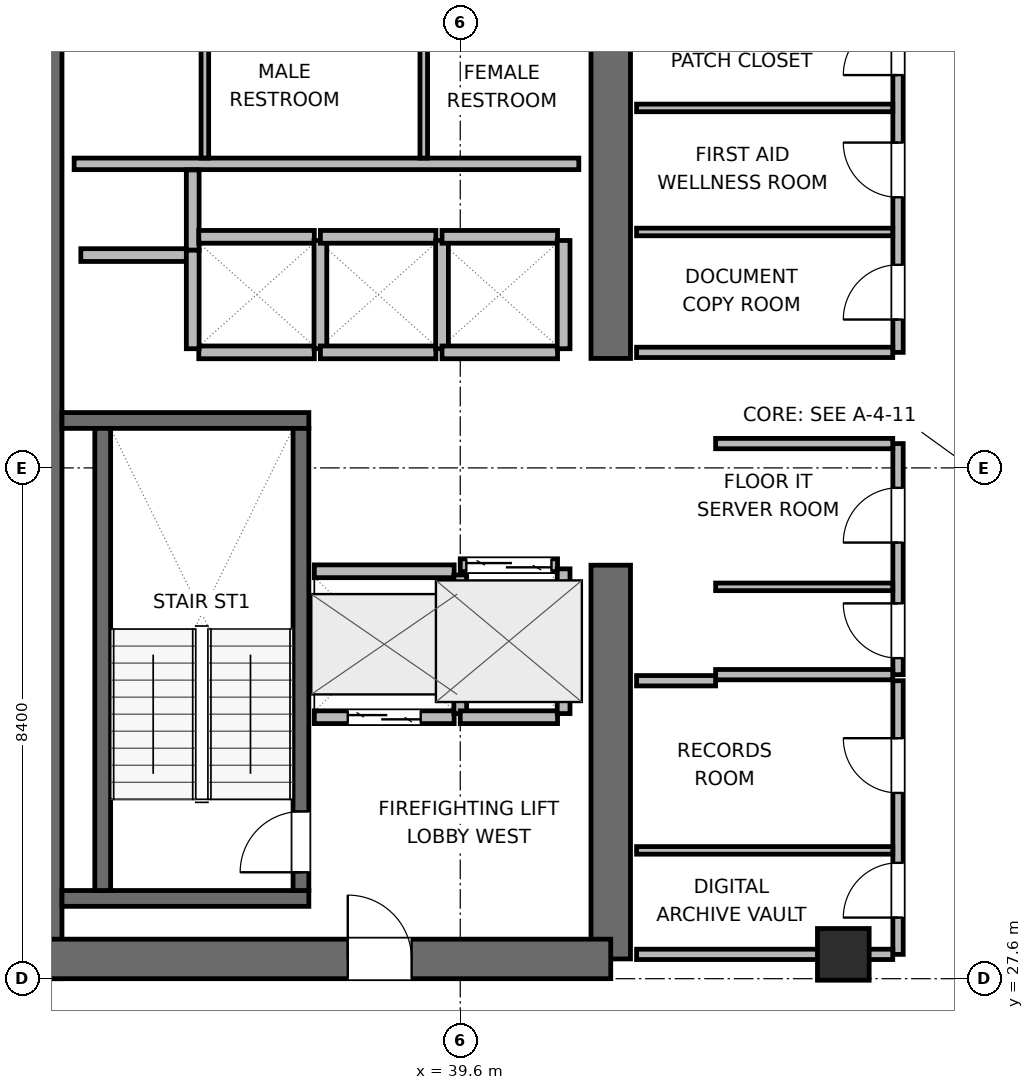
"""IFC4 building model, lengths in metres.
Left out: names, types, materials, properties, quantities, classifications, styles, units other than length and angle.
Written with IfcOpenShell. Run it as: python <this file> out.ifc"""

import sys

from ifc_helpers import new_model, si_unit, direction, frame, frame_2d, origin, origin_2d, place, context, subcontext, project, spatial, rectangle, extrude, element, fill, save


model = new_model("IFC4")
c1 = context("Model", 3, precision=1e-05, world=origin(), true_north=direction((0.0, 1.0)))
c2 = subcontext(c1, "Body", "Model", "MODEL_VIEW")
j1 = project(units=[si_unit("LENGTHUNIT", "METRE"), si_unit("PLANEANGLEUNIT", "RADIAN")], contexts=[c1])
p1 = place(None, origin())
s1 = spatial("IfcSite", under=j1, at=p1, CompositionType="ELEMENT")
p2 = place(p1, origin())
s2 = spatial("IfcBuilding", under=s1, at=p2, CompositionType="ELEMENT")
p3 = place(p2, frame((0.0, 0.0, 219.3)))
s3 = spatial("IfcBuildingStorey", under=s2, at=p3, CompositionType="ELEMENT", Elevation=219.3)
p4 = place(p3, frame((32.725, 27.6, 0.0), z_axis=(0.0, 0.0, 1.0), x_axis=(0.0, 1.0, 0.0)))
e1 = element("IfcWall", 1, at=p4, inside=s3, PredefinedType="SHEAR", context=c2, shape_type="SweptSolid", body=[
    extrude(rectangle(XDim=16.8, YDim=0.65, at=frame_2d((8.4, 0.0))), origin(), (0.0, 0.0, 1.0), 3.9),
])
p5 = place(p3, frame((42.075, 27.925, 0.0), z_axis=(0.0, 0.0, 1.0), x_axis=(0.0, 1.0, 0.0)))
e2 = element("IfcWall", 2, at=p5, inside=s3, PredefinedType="SHEAR", context=c2, shape_type="SweptSolid", body=[
    extrude(rectangle(XDim=6.475, YDim=0.65, at=frame_2d((3.237, 0.0))), origin(), (0.0, 0.0, 1.0), 3.9),
])
p6 = place(p3, frame((42.075, 37.8, 0.0), z_axis=(0.0, 0.0, 1.0), x_axis=(0.0, 1.0, 0.0)))
e3 = element("IfcWall", 3, at=p6, inside=s3, PredefinedType="SHEAR", context=c2, shape_type="SweptSolid", body=[
    extrude(rectangle(XDim=6.275, YDim=0.65, at=frame_2d((3.137, 0.0))), origin(), (0.0, 0.0, 1.0), 3.9),
])
p7 = place(p3, frame((32.725, 27.925, 0.0), z_axis=(0.0, 0.0, 1.0), x_axis=(1.0, 0.0, 0.0)))
e4 = element("IfcWall", 4, at=p7, inside=s3, PredefinedType="SHEAR", context=c2, shape_type="SweptSolid", body=[
    extrude(rectangle(XDim=9.35, YDim=0.65, at=frame_2d((4.675, 0.0))), origin(), (0.0, 0.0, 1.0), 3.9),
])
p8 = place(p7, frame((5.025, 0.0, 0.0)))
e5 = element("IfcOpeningElement", 5, at=p8, cuts=e4, PredefinedType="OPENING", context=c2, shape_type="SweptSolid", body=[
    extrude(rectangle(XDim=1.05, YDim=2.04, at=frame_2d((0.525, 1.02))), frame((0.0, 0.335, 0.0), z_axis=(0.0, -1.0, 0.0), x_axis=(1.0, 0.0, 0.0)), (0.0, 0.0, 1.0), 0.67),
])
for number, where, z_axis, x_axis in (
    (6, (33.05, 28.92, 0.0), (0.0, 0.0, 1.0), (1.0, 0.0, 0.0)),
    (7, (33.05, 36.78, 0.0), (0.0, 0.0, 1.0), (1.0, 0.0, 0.0)),
):
    element("IfcWall", number, at=place(p3, frame(where, z_axis=z_axis, x_axis=x_axis)), inside=s3, PredefinedType="SHEAR", context=c2, shape_type="SweptSolid", body=[
        extrude(rectangle(XDim=4.06, YDim=0.26, at=frame_2d((2.03, 0.0))), origin(), (0.0, 0.0, 1.0), 3.9),
    ])
p9 = place(p3, frame((33.72, 29.05, 0.0), z_axis=(0.0, 0.0, 1.0), x_axis=(0.0, 1.0, 0.0)))
e8 = element("IfcWall", 8, at=p9, inside=s3, PredefinedType="SHEAR", context=c2, shape_type="SweptSolid", body=[
    extrude(rectangle(XDim=7.6, YDim=0.26, at=frame_2d((3.8, 0.0))), origin(), (0.0, 0.0, 1.0), 3.9),
])
p10 = place(p3, frame((36.98, 29.05, 0.0), z_axis=(0.0, 0.0, 1.0), x_axis=(0.0, 1.0, 0.0)))
e9 = element("IfcWall", 9, at=p10, inside=s3, PredefinedType="SHEAR", context=c2, shape_type="SweptSolid", body=[
    extrude(rectangle(XDim=7.6, YDim=0.26, at=frame_2d((3.8, 0.0))), origin(), (0.0, 0.0, 1.0), 3.9),
])
p11 = place(p10, frame((0.3, 0.0, 0.0)))
e10 = element("IfcOpeningElement", 10, at=p11, cuts=e9, PredefinedType="OPENING", context=c2, shape_type="SweptSolid", body=[
    extrude(rectangle(XDim=1.0, YDim=2.04, at=frame_2d((0.5, 1.02))), frame((0.0, 0.14, 0.0), z_axis=(0.0, -1.0, 0.0), x_axis=(1.0, 0.0, 0.0)), (0.0, 0.0, 1.0), 0.28),
])
p12 = place(p3, frame((45.9, 28.0, 0.0), z_axis=(0.0, 0.0, 1.0), x_axis=(1.0, 0.0, 0.0)))
e11 = element("IfcColumn", 11, at=p12, inside=s3, PredefinedType="COLUMN", context=c2, shape_type="SweptSolid", body=[
    extrude(rectangle(XDim=0.85, YDim=0.85, at=origin_2d()), origin(), (0.0, 0.0, 1.0), 3.9),
])
p13 = place(p3, frame((33.25, 41.0, 0.0), z_axis=(0.0, 0.0, 1.0), x_axis=(1.0, 0.0, 0.0)))
e12 = element("IfcWall", 12, at=p13, inside=s3, PredefinedType="PLUMBINGWALL", context=c2, shape_type="SweptSolid", body=[
    extrude(rectangle(XDim=8.3, YDim=0.19, at=frame_2d((4.15, 0.0))), origin(), (0.0, 0.0, 1.0), 3.68),
])
for number, where, z_axis, x_axis in (
    (13, (35.4, 41.095, 0.0), (0.0, 0.0, 1.0), (0.0, 1.0, 0.0)),
    (14, (39.0, 41.095, 0.0), (0.0, 0.0, 1.0), (0.0, 1.0, 0.0)),
):
    element("IfcWall", number, at=place(p3, frame(where, z_axis=z_axis, x_axis=x_axis)), inside=s3, PredefinedType="PARTITIONING", context=c2, shape_type="SweptSolid", body=[
        extrude(rectangle(XDim=2.455, YDim=0.125, at=frame_2d((1.228, 0.0))), origin(), (0.0, 0.0, 1.0), 3.68),
    ])
p14 = place(p3, frame((33.36, 39.5, 0.0), z_axis=(0.0, 0.0, 1.0), x_axis=(1.0, 0.0, 0.0)))
e15 = element("IfcWall", 15, at=p14, inside=s3, PredefinedType="PARTITIONING", context=c2, shape_type="SweptSolid", body=[
    extrude(rectangle(XDim=1.86, YDim=0.21, at=frame_2d((0.93, 0.0))), origin(), (0.0, 0.0, 1.0), 3.68),
])
p15 = place(p3, frame((35.2, 39.58, 0.0), z_axis=(0.0, 0.0, 1.0), x_axis=(0.0, 1.0, 0.0)))
e16 = element("IfcWall", 16, at=p15, inside=s3, PredefinedType="PARTITIONING", context=c2, shape_type="SweptSolid", body=[
    extrude(rectangle(XDim=1.32, YDim=0.21, at=frame_2d((0.66, 0.0))), origin(), (0.0, 0.0, 1.0), 3.68),
])
p16 = place(p3, frame((37.2, 31.9, 0.0), z_axis=(0.0, 0.0, 1.0), x_axis=(1.0, 0.0, 0.0)))
e17 = element("IfcWall", 17, at=p16, inside=s3, PredefinedType="PARTITIONING", context=c2, shape_type="SweptSolid", body=[
    extrude(rectangle(XDim=2.3, YDim=0.21, at=frame_2d((1.15, 0.0))), origin(), (0.0, 0.0, 1.0), 3.68),
])
p17 = place(p16, frame((0.55, 0.0, 0.0)))
e18 = element("IfcOpeningElement", 18, at=p17, cuts=e17, PredefinedType="OPENING", context=c2, shape_type="SweptSolid", body=[
    extrude(rectangle(XDim=1.2, YDim=2.04, at=frame_2d((0.6, 1.02))), frame((0.0, 0.115, 0.0), z_axis=(0.0, -1.0, 0.0), x_axis=(1.0, 0.0, 0.0)), (0.0, 0.0, 1.0), 0.23),
])
p18 = place(p3, frame((37.2, 34.3, 0.0), z_axis=(0.0, 0.0, 1.0), x_axis=(1.0, 0.0, 0.0)))
e19 = element("IfcWall", 19, at=p18, inside=s3, PredefinedType="PARTITIONING", context=c2, shape_type="SweptSolid", body=[
    extrude(rectangle(XDim=2.3, YDim=0.21, at=frame_2d((1.15, 0.0))), origin(), (0.0, 0.0, 1.0), 3.68),
])
p19 = place(p3, frame((39.6, 31.96, 0.0), z_axis=(0.0, 0.0, 1.0), x_axis=(0.0, 1.0, 0.0)))
e20 = element("IfcWall", 20, at=p19, inside=s3, PredefinedType="PARTITIONING", context=c2, shape_type="SweptSolid", body=[
    extrude(rectangle(XDim=2.28, YDim=0.21, at=frame_2d((1.14, 0.0))), origin(), (0.0, 0.0, 1.0), 3.68),
])
p20 = place(p3, frame((39.6, 34.4, 0.0), z_axis=(0.0, 0.0, 1.0), x_axis=(1.0, 0.0, 0.0)))
e21 = element("IfcWall", 21, at=p20, inside=s3, PredefinedType="PARTITIONING", context=c2, shape_type="SweptSolid", body=[
    extrude(rectangle(XDim=1.6, YDim=0.21, at=frame_2d((0.8, 0.0))), origin(), (0.0, 0.0, 1.0), 3.68),
])
p21 = place(p20, frame((0.1, 0.0, 0.0)))
e22 = element("IfcOpeningElement", 22, at=p21, cuts=e21, PredefinedType="OPENING", context=c2, shape_type="SweptSolid", body=[
    extrude(rectangle(XDim=1.4, YDim=2.06, at=frame_2d((0.7, 1.03))), frame((0.0, 0.115, 0.0), z_axis=(0.0, -1.0, 0.0), x_axis=(1.0, 0.0, 0.0)), (0.0, 0.0, 1.0), 0.23),
])
p22 = place(p3, frame((39.6, 31.9, 0.0), z_axis=(0.0, 0.0, 1.0), x_axis=(1.0, 0.0, 0.0)))
e23 = element("IfcWall", 23, at=p22, inside=s3, PredefinedType="PARTITIONING", context=c2, shape_type="SweptSolid", body=[
    extrude(rectangle(XDim=1.6, YDim=0.21, at=frame_2d((0.8, 0.0))), origin(), (0.0, 0.0, 1.0), 3.68),
])
p23 = place(p3, frame((41.3, 31.96, 0.0), z_axis=(0.0, 0.0, 1.0), x_axis=(0.0, 1.0, 0.0)))
e24 = element("IfcWall", 24, at=p23, inside=s3, PredefinedType="PARTITIONING", context=c2, shape_type="SweptSolid", body=[
    extrude(rectangle(XDim=2.38, YDim=0.21, at=frame_2d((1.19, 0.0))), origin(), (0.0, 0.0, 1.0), 3.68),
])
for number, where, z_axis, x_axis in (
    (25, (35.3, 37.9, 0.0), (0.0, 0.0, 1.0), (1.0, 0.0, 0.0)),
    (26, (35.3, 39.8, 0.0), (0.0, 0.0, 1.0), (1.0, 0.0, 0.0)),
):
    element("IfcWall", number, at=place(p3, frame(where, z_axis=z_axis, x_axis=x_axis)), inside=s3, PredefinedType="PARTITIONING", context=c2, shape_type="SweptSolid", body=[
        extrude(rectangle(XDim=1.9, YDim=0.21, at=frame_2d((0.95, 0.0))), origin(), (0.0, 0.0, 1.0), 3.68),
    ])
p24 = place(p3, frame((35.2, 37.96, 0.0), z_axis=(0.0, 0.0, 1.0), x_axis=(0.0, 1.0, 0.0)))
e27 = element("IfcWall", 27, at=p24, inside=s3, PredefinedType="PARTITIONING", context=c2, shape_type="SweptSolid", body=[
    extrude(rectangle(XDim=1.62, YDim=0.21, at=frame_2d((0.81, 0.0))), origin(), (0.0, 0.0, 1.0), 3.68),
])
p25 = place(p3, frame((37.3, 37.96, 0.0), z_axis=(0.0, 0.0, 1.0), x_axis=(0.0, 1.0, 0.0)))
e28 = element("IfcWall", 28, at=p25, inside=s3, PredefinedType="PARTITIONING", context=c2, shape_type="SweptSolid", body=[
    extrude(rectangle(XDim=1.78, YDim=0.21, at=frame_2d((0.89, 0.0))), origin(), (0.0, 0.0, 1.0), 3.68),
])
for number, where, z_axis, x_axis in (
    (29, (37.3, 37.9, 0.0), (0.0, 0.0, 1.0), (1.0, 0.0, 0.0)),
    (30, (37.3, 39.8, 0.0), (0.0, 0.0, 1.0), (1.0, 0.0, 0.0)),
):
    element("IfcWall", number, at=place(p3, frame(where, z_axis=z_axis, x_axis=x_axis)), inside=s3, PredefinedType="PARTITIONING", context=c2, shape_type="SweptSolid", body=[
        extrude(rectangle(XDim=1.9, YDim=0.21, at=frame_2d((0.95, 0.0))), origin(), (0.0, 0.0, 1.0), 3.68),
    ])
p26 = place(p3, frame((39.3, 37.96, 0.0), z_axis=(0.0, 0.0, 1.0), x_axis=(0.0, 1.0, 0.0)))
e31 = element("IfcWall", 31, at=p26, inside=s3, PredefinedType="PARTITIONING", context=c2, shape_type="SweptSolid", body=[
    extrude(rectangle(XDim=1.78, YDim=0.21, at=frame_2d((0.89, 0.0))), origin(), (0.0, 0.0, 1.0), 3.68),
])
for number, where, z_axis, x_axis in (
    (32, (39.3, 37.9, 0.0), (0.0, 0.0, 1.0), (1.0, 0.0, 0.0)),
    (33, (39.3, 39.8, 0.0), (0.0, 0.0, 1.0), (1.0, 0.0, 0.0)),
):
    element("IfcWall", number, at=place(p3, frame(where, z_axis=z_axis, x_axis=x_axis)), inside=s3, PredefinedType="PARTITIONING", context=c2, shape_type="SweptSolid", body=[
        extrude(rectangle(XDim=1.9, YDim=0.21, at=frame_2d((0.95, 0.0))), origin(), (0.0, 0.0, 1.0), 3.68),
    ])
p27 = place(p3, frame((41.3, 37.96, 0.0), z_axis=(0.0, 0.0, 1.0), x_axis=(0.0, 1.0, 0.0)))
e34 = element("IfcWall", 34, at=p27, inside=s3, PredefinedType="PARTITIONING", context=c2, shape_type="SweptSolid", body=[
    extrude(rectangle(XDim=1.78, YDim=0.21, at=frame_2d((0.89, 0.0))), origin(), (0.0, 0.0, 1.0), 3.68),
])
p28 = place(p3, frame((46.8, 32.6, 0.0), z_axis=(0.0, 0.0, 1.0), x_axis=(0.0, 1.0, 0.0)))
e35 = element("IfcWall", 35, at=p28, inside=s3, PredefinedType="PARTITIONING", context=c2, shape_type="SweptSolid", body=[
    extrude(rectangle(XDim=3.8, YDim=0.17, at=frame_2d((1.9, 0.0))), origin(), (0.0, 0.0, 1.0), 3.68),
])
p29 = place(p28, frame((0.272, 0.0, 0.0)))
e36 = element("IfcOpeningElement", 36, at=p29, cuts=e35, PredefinedType="OPENING", context=c2, shape_type="SweptSolid", body=[
    extrude(rectangle(XDim=0.9, YDim=2.02, at=frame_2d((0.45, 1.01))), frame((0.0, 0.095, 0.0), z_axis=(0.0, -1.0, 0.0), x_axis=(1.0, 0.0, 0.0)), (0.0, 0.0, 1.0), 0.19),
])
p30 = place(p28, frame((2.172, 0.0, 0.0)))
e37 = element("IfcOpeningElement", 37, at=p30, cuts=e35, PredefinedType="OPENING", context=c2, shape_type="SweptSolid", body=[
    extrude(rectangle(XDim=0.9, YDim=2.02, at=frame_2d((0.45, 1.01))), frame((0.0, 0.095, 0.0), z_axis=(0.0, -1.0, 0.0), x_axis=(1.0, 0.0, 0.0)), (0.0, 0.0, 1.0), 0.19),
])
for number, where, z_axis, x_axis in (
    (38, (43.8, 32.6, 0.0), (0.0, 0.0, 1.0), (1.0, 0.0, 0.0)),
    (39, (43.8, 36.4, 0.0), (0.0, 0.0, 1.0), (1.0, 0.0, 0.0)),
):
    element("IfcWall", number, at=place(p3, frame(where, z_axis=z_axis, x_axis=x_axis)), inside=s3, PredefinedType="PARTITIONING", context=c2, shape_type="SweptSolid", body=[
        extrude(rectangle(XDim=2.913, YDim=0.17, at=frame_2d((1.457, 0.0))), origin(), (0.0, 0.0, 1.0), 3.68),
    ])
p31 = place(p3, frame((43.8, 34.044, 0.0), z_axis=(0.0, 0.0, 1.0), x_axis=(1.0, 0.0, 0.0)))
e40 = element("IfcWall", 40, at=p31, inside=s3, PredefinedType="PARTITIONING", context=c2, shape_type="SweptSolid", body=[
    extrude(rectangle(XDim=2.913, YDim=0.125, at=frame_2d((1.457, 0.0))), origin(), (0.0, 0.0, 1.0), 3.68),
])
p32 = place(p3, frame((46.8, 28.0, 0.0), z_axis=(0.0, 0.0, 1.0), x_axis=(0.0, 1.0, 0.0)))
e41 = element("IfcWall", 41, at=p32, inside=s3, PredefinedType="PARTITIONING", context=c2, shape_type="SweptSolid", body=[
    extrude(rectangle(XDim=4.5, YDim=0.17, at=frame_2d((2.25, 0.0))), origin(), (0.0, 0.0, 1.0), 3.68),
])
p33 = place(p32, frame((0.605, 0.0, 0.0)))
e42 = element("IfcOpeningElement", 42, at=p33, cuts=e41, PredefinedType="OPENING", context=c2, shape_type="SweptSolid", body=[
    extrude(rectangle(XDim=0.9, YDim=2.02, at=frame_2d((0.45, 1.01))), frame((0.0, 0.095, 0.0), z_axis=(0.0, -1.0, 0.0), x_axis=(1.0, 0.0, 0.0)), (0.0, 0.0, 1.0), 0.19),
])
p34 = place(p32, frame((2.655, 0.0, 0.0)))
e43 = element("IfcOpeningElement", 43, at=p34, cuts=e41, PredefinedType="OPENING", context=c2, shape_type="SweptSolid", body=[
    extrude(rectangle(XDim=0.9, YDim=2.02, at=frame_2d((0.45, 1.01))), frame((0.0, 0.095, 0.0), z_axis=(0.0, -1.0, 0.0), x_axis=(1.0, 0.0, 0.0)), (0.0, 0.0, 1.0), 0.19),
])
p35 = place(p3, frame((42.5, 28.0, 0.0), z_axis=(0.0, 0.0, 1.0), x_axis=(1.0, 0.0, 0.0)))
e44 = element("IfcWall", 44, at=p35, inside=s3, PredefinedType="PARTITIONING", context=c2, shape_type="SweptSolid", body=[
    extrude(rectangle(XDim=4.213, YDim=0.17, at=frame_2d((2.106, 0.0))), origin(), (0.0, 0.0, 1.0), 2.765),
])
p36 = place(p3, frame((42.5, 32.5, 0.0), z_axis=(0.0, 0.0, 1.0), x_axis=(1.0, 0.0, 0.0)))
e45 = element("IfcWall", 45, at=p36, inside=s3, PredefinedType="PARTITIONING", context=c2, shape_type="SweptSolid", body=[
    extrude(rectangle(XDim=1.3, YDim=0.17, at=frame_2d((0.65, 0.0))), origin(), (0.0, 0.0, 1.0), 3.68),
])
p37 = place(p3, frame((42.5, 29.71, 0.0), z_axis=(0.0, 0.0, 1.0), x_axis=(1.0, 0.0, 0.0)))
e46 = element("IfcWall", 46, at=p37, inside=s3, PredefinedType="PARTITIONING", context=c2, shape_type="SweptSolid", body=[
    extrude(rectangle(XDim=4.213, YDim=0.125, at=frame_2d((2.106, 0.0))), origin(), (0.0, 0.0, 1.0), 3.68),
])
p38 = place(p3, frame((46.8, 37.9, 0.0), z_axis=(0.0, 0.0, 1.0), x_axis=(0.0, 1.0, 0.0)))
e47 = element("IfcWall", 47, at=p38, inside=s3, PredefinedType="PARTITIONING", context=c2, shape_type="SweptSolid", body=[
    extrude(rectangle(XDim=6.0, YDim=0.17, at=frame_2d((3.0, 0.0))), origin(), (0.0, 0.0, 1.0), 3.68),
])
p39 = place(p38, frame((0.54, 0.0, 0.0)))
e48 = element("IfcOpeningElement", 48, at=p39, cuts=e47, PredefinedType="OPENING", context=c2, shape_type="SweptSolid", body=[
    extrude(rectangle(XDim=0.9, YDim=2.02, at=frame_2d((0.45, 1.01))), frame((0.0, 0.095, 0.0), z_axis=(0.0, -1.0, 0.0), x_axis=(1.0, 0.0, 0.0)), (0.0, 0.0, 1.0), 0.19),
])
p40 = place(p38, frame((2.55, 0.0, 0.0)))
e49 = element("IfcOpeningElement", 49, at=p40, cuts=e47, PredefinedType="OPENING", context=c2, shape_type="SweptSolid", body=[
    extrude(rectangle(XDim=0.9, YDim=2.02, at=frame_2d((0.45, 1.01))), frame((0.0, 0.095, 0.0), z_axis=(0.0, -1.0, 0.0), x_axis=(1.0, 0.0, 0.0)), (0.0, 0.0, 1.0), 0.19),
])
p41 = place(p38, frame((4.56, 0.0, 0.0)))
e50 = element("IfcOpeningElement", 50, at=p41, cuts=e47, PredefinedType="OPENING", context=c2, shape_type="SweptSolid", body=[
    extrude(rectangle(XDim=0.9, YDim=2.02, at=frame_2d((0.45, 1.01))), frame((0.0, 0.095, 0.0), z_axis=(0.0, -1.0, 0.0), x_axis=(1.0, 0.0, 0.0)), (0.0, 0.0, 1.0), 0.19),
])
p42 = place(p3, frame((42.5, 37.9, 0.0), z_axis=(0.0, 0.0, 1.0), x_axis=(1.0, 0.0, 0.0)))
e51 = element("IfcWall", 51, at=p42, inside=s3, PredefinedType="PARTITIONING", context=c2, shape_type="SweptSolid", body=[
    extrude(rectangle(XDim=4.213, YDim=0.17, at=frame_2d((2.106, 0.0))), origin(), (0.0, 0.0, 1.0), 3.68),
])
for number, where, z_axis, x_axis in (
    (52, (42.5, 39.88, 0.0), (0.0, 0.0, 1.0), (1.0, 0.0, 0.0)),
    (53, (42.5, 41.92, 0.0), (0.0, 0.0, 1.0), (1.0, 0.0, 0.0)),
):
    element("IfcWall", number, at=place(p3, frame(where, z_axis=z_axis, x_axis=x_axis)), inside=s3, PredefinedType="PARTITIONING", context=c2, shape_type="SweptSolid", body=[
        extrude(rectangle(XDim=4.213, YDim=0.125, at=frame_2d((2.106, 0.0))), origin(), (0.0, 0.0, 1.0), 3.68),
    ])
p43 = place(p11, origin())
e54 = element("IfcDoor", 54, at=p43, inside=s3, OperationType="SINGLE_SWING_LEFT", PredefinedType="DOOR", context=c2, shape_type="SweptSolid", body=[
    extrude(rectangle(XDim=1.0, YDim=2.04, at=frame_2d((0.5, 1.02))), frame((0.0, 0.025, 0.0), z_axis=(0.0, -1.0, 0.0), x_axis=(1.0, 0.0, 0.0)), (0.0, 0.0, 1.0), 0.05),
])
fill(e10, e54)
p44 = place(p17, origin())
e55 = element("IfcDoor", 55, at=p44, inside=s3, OperationType="DOUBLE_DOOR_SLIDING", PredefinedType="DOOR", context=c2, shape_type="SweptSolid", body=[
    extrude(rectangle(XDim=1.2, YDim=2.04, at=frame_2d((0.6, 1.02))), frame((0.0, 0.025, 0.0), z_axis=(0.0, -1.0, 0.0), x_axis=(1.0, 0.0, 0.0)), (0.0, 0.0, 1.0), 0.05),
])
fill(e18, e55)
p45 = place(p21, origin())
e56 = element("IfcDoor", 56, at=p45, inside=s3, OperationType="DOUBLE_DOOR_SLIDING", PredefinedType="DOOR", context=c2, shape_type="SweptSolid", body=[
    extrude(rectangle(XDim=1.4, YDim=2.06, at=frame_2d((0.7, 1.03))), frame((0.0, 0.025, 0.0), z_axis=(0.0, -1.0, 0.0), x_axis=(1.0, 0.0, 0.0)), (0.0, 0.0, 1.0), 0.05),
])
fill(e22, e56)
p46 = place(p8, origin())
e57 = element("IfcDoor", 57, at=p46, inside=s3, OperationType="SINGLE_SWING_LEFT", PredefinedType="DOOR", context=c2, shape_type="SweptSolid", body=[
    extrude(rectangle(XDim=1.05, YDim=2.04, at=frame_2d((0.525, 1.02))), frame((0.0, 0.025, 0.0), z_axis=(0.0, -1.0, 0.0), x_axis=(1.0, 0.0, 0.0)), (0.0, 0.0, 1.0), 0.05),
])
fill(e5, e57)
p47 = place(p29, origin())
e58 = element("IfcDoor", 58, at=p47, inside=s3, OperationType="SINGLE_SWING_RIGHT", PredefinedType="DOOR", context=c2, shape_type="SweptSolid", body=[
    extrude(rectangle(XDim=0.9, YDim=2.02, at=frame_2d((0.45, 1.01))), frame((0.0, 0.025, 0.0), z_axis=(0.0, -1.0, 0.0), x_axis=(1.0, 0.0, 0.0)), (0.0, 0.0, 1.0), 0.05),
])
fill(e36, e58)
p48 = place(p30, origin())
e59 = element("IfcDoor", 59, at=p48, inside=s3, OperationType="SINGLE_SWING_LEFT", PredefinedType="DOOR", context=c2, shape_type="SweptSolid", body=[
    extrude(rectangle(XDim=0.9, YDim=2.02, at=frame_2d((0.45, 1.01))), frame((0.0, 0.025, 0.0), z_axis=(0.0, -1.0, 0.0), x_axis=(1.0, 0.0, 0.0)), (0.0, 0.0, 1.0), 0.05),
])
fill(e37, e59)
p49 = place(p33, origin())
e60 = element("IfcDoor", 60, at=p49, inside=s3, OperationType="SINGLE_SWING_LEFT", PredefinedType="DOOR", context=c2, shape_type="SweptSolid", body=[
    extrude(rectangle(XDim=0.9, YDim=2.02, at=frame_2d((0.45, 1.01))), frame((0.0, 0.025, 0.0), z_axis=(0.0, -1.0, 0.0), x_axis=(1.0, 0.0, 0.0)), (0.0, 0.0, 1.0), 0.05),
])
fill(e42, e60)
p50 = place(p34, origin())
e61 = element("IfcDoor", 61, at=p50, inside=s3, OperationType="SINGLE_SWING_RIGHT", PredefinedType="DOOR", context=c2, shape_type="SweptSolid", body=[
    extrude(rectangle(XDim=0.9, YDim=2.02, at=frame_2d((0.45, 1.01))), frame((0.0, 0.025, 0.0), z_axis=(0.0, -1.0, 0.0), x_axis=(1.0, 0.0, 0.0)), (0.0, 0.0, 1.0), 0.05),
])
fill(e43, e61)
p51 = place(p39, origin())
e62 = element("IfcDoor", 62, at=p51, inside=s3, OperationType="SINGLE_SWING_LEFT", PredefinedType="DOOR", context=c2, shape_type="SweptSolid", body=[
    extrude(rectangle(XDim=0.9, YDim=2.02, at=frame_2d((0.45, 1.01))), frame((0.0, 0.025, 0.0), z_axis=(0.0, -1.0, 0.0), x_axis=(1.0, 0.0, 0.0)), (0.0, 0.0, 1.0), 0.05),
])
fill(e48, e62)
p52 = place(p40, origin())
e63 = element("IfcDoor", 63, at=p52, inside=s3, OperationType="SINGLE_SWING_RIGHT", PredefinedType="DOOR", context=c2, shape_type="SweptSolid", body=[
    extrude(rectangle(XDim=0.9, YDim=2.02, at=frame_2d((0.45, 1.01))), frame((0.0, 0.025, 0.0), z_axis=(0.0, -1.0, 0.0), x_axis=(1.0, 0.0, 0.0)), (0.0, 0.0, 1.0), 0.05),
])
fill(e49, e63)
p53 = place(p41, origin())
e64 = element("IfcDoor", 64, at=p53, inside=s3, OperationType="SINGLE_SWING_LEFT", PredefinedType="DOOR", context=c2, shape_type="SweptSolid", body=[
    extrude(rectangle(XDim=0.9, YDim=2.02, at=frame_2d((0.45, 1.01))), frame((0.0, 0.025, 0.0), z_axis=(0.0, -1.0, 0.0), x_axis=(1.0, 0.0, 0.0)), (0.0, 0.0, 1.0), 0.05),
])
fill(e50, e64)
save(model, sys.argv[1])
